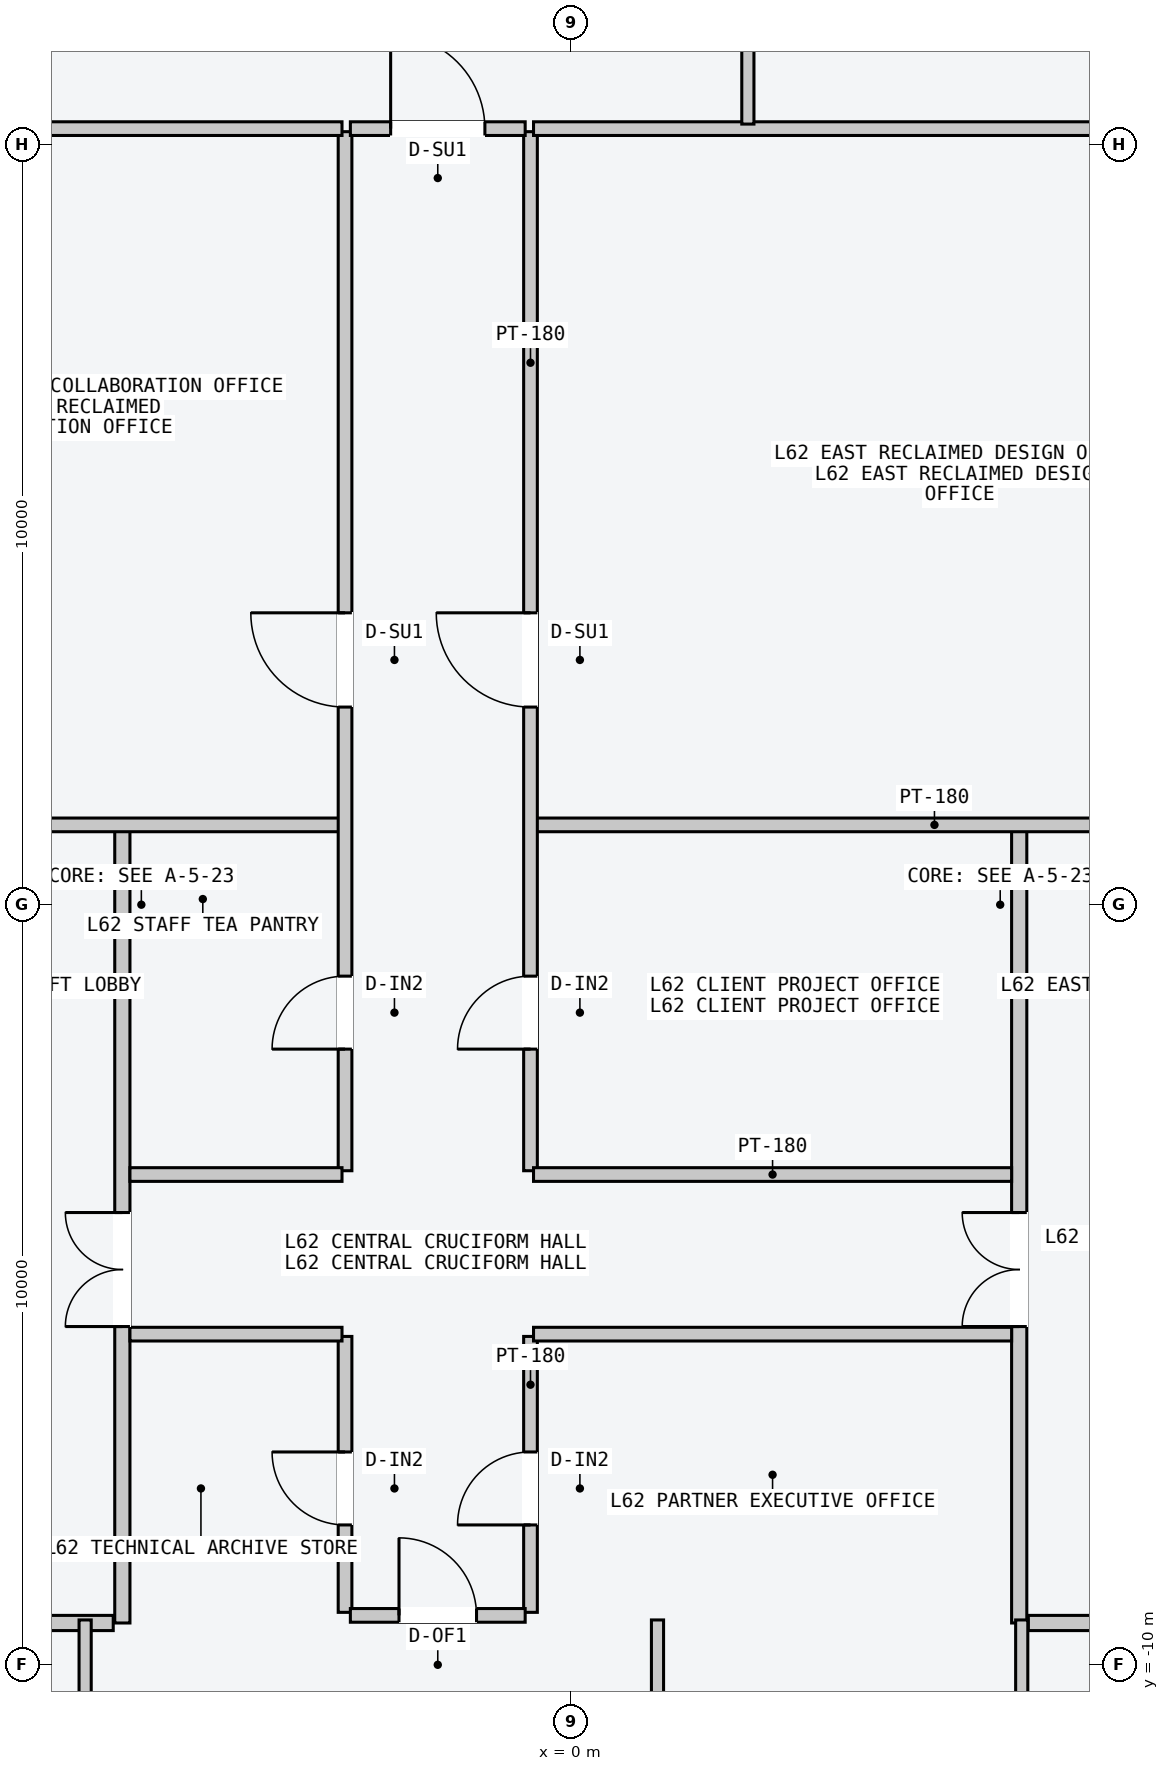
"""IFC4 building model, lengths in metres.
Left out: names, types, materials, properties, quantities, classifications, styles, units other than length and angle.
Written with IfcOpenShell. Run it as: python <this file> out.ifc"""

import sys

from ifc_helpers import new_model, si_unit, direction, frame, frame_2d, origin, place, context, subcontext, project, spatial, rectangle, extrude, element, fill, save


model = new_model("IFC4")
c1 = context("Model", 3, precision=1e-05, world=origin(), true_north=direction((0.0, 1.0)))
c2 = subcontext(c1, "Body", "Model", "MODEL_VIEW")
j1 = project(units=[si_unit("LENGTHUNIT", "METRE"), si_unit("PLANEANGLEUNIT", "RADIAN")], contexts=[c1])
p1 = place(None, origin())
s1 = spatial("IfcSite", under=j1, at=p1, CompositionType="ELEMENT")
p2 = place(p1, origin())
s2 = spatial("IfcBuilding", under=s1, at=p2, CompositionType="ELEMENT")
p3 = place(p2, frame((0.0, 0.0, 236.4)))
s3 = spatial("IfcBuildingStorey", under=s2, at=p3, CompositionType="ELEMENT", Elevation=236.4)
p4 = place(p3, frame((-5.9, -9.45, 0.0), z_axis=(0.0, 0.0, 1.0), x_axis=(0.0, 1.0, 0.0)))
e1 = element("IfcWall", 1, at=p4, inside=s3, PredefinedType="PARTITIONING", context=c2, shape_type="SweptSolid", body=[
    extrude(rectangle(XDim=10.5, YDim=0.2, at=frame_2d((5.25, 0.0))), origin(), (0.0, 0.0, 1.0), 3.4),
])
p5 = place(p4, frame((3.9, 0.0, 0.0)))
e2 = element("IfcOpeningElement", 2, at=p5, cuts=e1, PredefinedType="OPENING", context=c2, shape_type="SweptSolid", body=[
    extrude(rectangle(XDim=1.5, YDim=2.2, at=frame_2d((0.75, 1.1))), frame((0.0, 0.11, 0.0), z_axis=(0.0, -1.0, 0.0), x_axis=(1.0, 0.0, 0.0)), (0.0, 0.0, 1.0), 0.22),
])
p6 = place(p3, frame((-6.02, -9.45, 0.0), z_axis=(0.0, 0.0, 1.0), x_axis=(-1.0, 0.0, 0.0)))
e3 = element("IfcWall", 3, at=p6, inside=s3, PredefinedType="PARTITIONING", context=c2, shape_type="SweptSolid", body=[
    extrude(rectangle(XDim=1.8, YDim=0.2, at=frame_2d((0.9, 0.0))), origin(), (0.0, 0.0, 1.0), 3.4),
])
p7 = place(p3, frame((5.9, -9.45, 0.0), z_axis=(0.0, 0.0, 1.0), x_axis=(0.0, 1.0, 0.0)))
e4 = element("IfcWall", 4, at=p7, inside=s3, PredefinedType="PARTITIONING", context=c2, shape_type="SweptSolid", body=[
    extrude(rectangle(XDim=10.5, YDim=0.2, at=frame_2d((5.25, 0.0))), origin(), (0.0, 0.0, 1.0), 3.4),
])
p8 = place(p7, frame((3.9, 0.0, 0.0)))
e5 = element("IfcOpeningElement", 5, at=p8, cuts=e4, PredefinedType="OPENING", context=c2, shape_type="SweptSolid", body=[
    extrude(rectangle(XDim=1.5, YDim=2.2, at=frame_2d((0.75, 1.1))), frame((0.0, 0.11, 0.0), z_axis=(0.0, -1.0, 0.0), x_axis=(1.0, 0.0, 0.0)), (0.0, 0.0, 1.0), 0.22),
])
p9 = place(p3, frame((6.02, -9.45, 0.0), z_axis=(0.0, 0.0, 1.0), x_axis=(1.0, 0.0, 0.0)))
e6 = element("IfcWall", 6, at=p9, inside=s3, PredefinedType="PARTITIONING", context=c2, shape_type="SweptSolid", body=[
    extrude(rectangle(XDim=1.8, YDim=0.2, at=frame_2d((0.9, 0.0))), origin(), (0.0, 0.0, 1.0), 3.4),
])
p10 = place(p3, frame((-10.05, 1.05, 0.0), z_axis=(0.0, 0.0, 1.0), x_axis=(1.0, 0.0, 0.0)))
e7 = element("IfcWall", 7, at=p10, inside=s3, PredefinedType="PARTITIONING", context=c2, shape_type="SweptSolid", body=[
    extrude(rectangle(XDim=7.04, YDim=0.18, at=frame_2d((3.52, 0.0))), origin(), (0.0, 0.0, 1.0), 3.4),
])
p11 = place(p3, frame((-2.97, -3.5, 0.0), z_axis=(0.0, 0.0, 1.0), x_axis=(0.0, 1.0, 0.0)))
e8 = element("IfcWall", 8, at=p11, inside=s3, PredefinedType="PARTITIONING", context=c2, shape_type="SweptSolid", body=[
    extrude(rectangle(XDim=13.67, YDim=0.18, at=frame_2d((6.835, 0.0))), origin(), (0.0, 0.0, 1.0), 3.4),
])
p12 = place(p11, frame((6.1, 0.0, 0.0)))
e9 = element("IfcOpeningElement", 9, at=p12, cuts=e8, PredefinedType="OPENING", context=c2, shape_type="SweptSolid", body=[
    extrude(rectangle(XDim=1.24, YDim=2.24, at=frame_2d((0.62, 1.12))), frame((0.0, 0.1, 0.0), z_axis=(0.0, -1.0, 0.0), x_axis=(1.0, 0.0, 0.0)), (0.0, 0.0, 1.0), 0.2),
])
p13 = place(p11, frame((1.6, 0.0, 0.0)))
e10 = element("IfcOpeningElement", 10, at=p13, cuts=e8, PredefinedType="OPENING", context=c2, shape_type="SweptSolid", body=[
    extrude(rectangle(XDim=0.96, YDim=2.18, at=frame_2d((0.48, 1.09))), frame((0.0, 0.1, 0.0), z_axis=(0.0, -1.0, 0.0), x_axis=(1.0, 0.0, 0.0)), (0.0, 0.0, 1.0), 0.2),
])
p14 = place(p3, frame((-7.5, 10.21, 0.0), z_axis=(0.0, 0.0, 1.0), x_axis=(1.0, 0.0, 0.0)))
e11 = element("IfcWall", 11, at=p14, inside=s3, PredefinedType="PARTITIONING", context=c2, shape_type="SweptSolid", body=[
    extrude(rectangle(XDim=4.49, YDim=0.18, at=frame_2d((2.245, 0.0))), origin(), (0.0, 0.0, 1.0), 3.4),
])
p15 = place(p3, frame((-5.8, -3.55, 0.0), z_axis=(0.0, 0.0, 1.0), x_axis=(1.0, 0.0, 0.0)))
e12 = element("IfcWall", 12, at=p15, inside=s3, PredefinedType="PARTITIONING", context=c2, shape_type="SweptSolid", body=[
    extrude(rectangle(XDim=2.79, YDim=0.18, at=frame_2d((1.395, 0.0))), origin(), (0.0, 0.0, 1.0), 3.4),
])
p16 = place(p3, frame((-0.49, 1.05, 0.0), z_axis=(0.0, 0.0, 1.0), x_axis=(1.0, 0.0, 0.0)))
e13 = element("IfcWall", 13, at=p16, inside=s3, PredefinedType="PARTITIONING", context=c2, shape_type="SweptSolid", body=[
    extrude(rectangle(XDim=10.55, YDim=0.18, at=frame_2d((5.275, 0.0))), origin(), (0.0, 0.0, 1.0), 3.4),
])
p17 = place(p3, frame((-0.53, -3.5, 0.0), z_axis=(0.0, 0.0, 1.0), x_axis=(0.0, 1.0, 0.0)))
e14 = element("IfcWall", 14, at=p17, inside=s3, PredefinedType="PARTITIONING", context=c2, shape_type="SweptSolid", body=[
    extrude(rectangle(XDim=13.67, YDim=0.18, at=frame_2d((6.835, 0.0))), origin(), (0.0, 0.0, 1.0), 3.4),
])
p18 = place(p17, frame((6.1, 0.0, 0.0)))
e15 = element("IfcOpeningElement", 15, at=p18, cuts=e14, PredefinedType="OPENING", context=c2, shape_type="SweptSolid", body=[
    extrude(rectangle(XDim=1.24, YDim=2.24, at=frame_2d((0.62, 1.12))), frame((0.0, 0.1, 0.0), z_axis=(0.0, -1.0, 0.0), x_axis=(1.0, 0.0, 0.0)), (0.0, 0.0, 1.0), 0.2),
])
p19 = place(p17, frame((1.6, 0.0, 0.0)))
e16 = element("IfcOpeningElement", 16, at=p19, cuts=e14, PredefinedType="OPENING", context=c2, shape_type="SweptSolid", body=[
    extrude(rectangle(XDim=0.96, YDim=2.18, at=frame_2d((0.48, 1.09))), frame((0.0, 0.1, 0.0), z_axis=(0.0, -1.0, 0.0), x_axis=(1.0, 0.0, 0.0)), (0.0, 0.0, 1.0), 0.2),
])
p20 = place(p3, frame((-0.49, 10.21, 0.0), z_axis=(0.0, 0.0, 1.0), x_axis=(1.0, 0.0, 0.0)))
e17 = element("IfcWall", 17, at=p20, inside=s3, PredefinedType="PARTITIONING", context=c2, shape_type="SweptSolid", body=[
    extrude(rectangle(XDim=7.99, YDim=0.18, at=frame_2d((3.995, 0.0))), origin(), (0.0, 0.0, 1.0), 3.4),
])
p21 = place(p3, frame((-0.49, -3.55, 0.0), z_axis=(0.0, 0.0, 1.0), x_axis=(1.0, 0.0, 0.0)))
e18 = element("IfcWall", 18, at=p21, inside=s3, PredefinedType="PARTITIONING", context=c2, shape_type="SweptSolid", body=[
    extrude(rectangle(XDim=6.29, YDim=0.18, at=frame_2d((3.145, 0.0))), origin(), (0.0, 0.0, 1.0), 3.4),
])
p22 = place(p3, frame((-2.97, -9.31, 0.0), z_axis=(0.0, 0.0, 1.0), x_axis=(0.0, 1.0, 0.0)))
e19 = element("IfcWall", 19, at=p22, inside=s3, PredefinedType="PARTITIONING", context=c2, shape_type="SweptSolid", body=[
    extrude(rectangle(XDim=3.63, YDim=0.18, at=frame_2d((1.815, 0.0))), origin(), (0.0, 0.0, 1.0), 3.4),
])
p23 = place(p22, frame((1.15, 0.0, 0.0)))
e20 = element("IfcOpeningElement", 20, at=p23, cuts=e19, PredefinedType="OPENING", context=c2, shape_type="SweptSolid", body=[
    extrude(rectangle(XDim=0.96, YDim=2.18, at=frame_2d((0.48, 1.09))), frame((0.0, 0.1, 0.0), z_axis=(0.0, -1.0, 0.0), x_axis=(1.0, 0.0, 0.0)), (0.0, 0.0, 1.0), 0.2),
])
p24 = place(p3, frame((-0.53, -9.31, 0.0), z_axis=(0.0, 0.0, 1.0), x_axis=(0.0, 1.0, 0.0)))
e21 = element("IfcWall", 21, at=p24, inside=s3, PredefinedType="PARTITIONING", context=c2, shape_type="SweptSolid", body=[
    extrude(rectangle(XDim=3.63, YDim=0.18, at=frame_2d((1.815, 0.0))), origin(), (0.0, 0.0, 1.0), 3.4),
])
p25 = place(p24, frame((1.15, 0.0, 0.0)))
e22 = element("IfcOpeningElement", 22, at=p25, cuts=e21, PredefinedType="OPENING", context=c2, shape_type="SweptSolid", body=[
    extrude(rectangle(XDim=0.96, YDim=2.18, at=frame_2d((0.48, 1.09))), frame((0.0, 0.1, 0.0), z_axis=(0.0, -1.0, 0.0), x_axis=(1.0, 0.0, 0.0)), (0.0, 0.0, 1.0), 0.2),
])
p26 = place(p3, frame((-5.8, -5.65, 0.0), z_axis=(0.0, 0.0, 1.0), x_axis=(1.0, 0.0, 0.0)))
e23 = element("IfcWall", 23, at=p26, inside=s3, PredefinedType="PARTITIONING", context=c2, shape_type="SweptSolid", body=[
    extrude(rectangle(XDim=2.79, YDim=0.18, at=frame_2d((1.395, 0.0))), origin(), (0.0, 0.0, 1.0), 3.4),
])
p27 = place(p3, frame((-0.49, -5.65, 0.0), z_axis=(0.0, 0.0, 1.0), x_axis=(1.0, 0.0, 0.0)))
e24 = element("IfcWall", 24, at=p27, inside=s3, PredefinedType="PARTITIONING", context=c2, shape_type="SweptSolid", body=[
    extrude(rectangle(XDim=6.29, YDim=0.18, at=frame_2d((3.145, 0.0))), origin(), (0.0, 0.0, 1.0), 3.4),
])
p28 = place(p3, frame((2.33, 10.27, 0.0), z_axis=(0.0, 0.0, 1.0), x_axis=(0.0, 1.0, 0.0)))
e25 = element("IfcWall", 25, at=p28, inside=s3, PredefinedType="PARTITIONING", context=c2, shape_type="SweptSolid", body=[
    extrude(rectangle(XDim=6.28, YDim=0.16, at=frame_2d((3.14, 0.0))), origin(), (0.0, 0.0, 1.0), 3.4),
])
p29 = place(p28, frame((1.15, 0.0, 0.0)))
e26 = element("IfcOpeningElement", 26, at=p29, cuts=e25, PredefinedType="OPENING", context=c2, shape_type="SweptSolid", body=[
    extrude(rectangle(XDim=0.96, YDim=2.18, at=frame_2d((0.48, 1.09))), frame((0.0, 0.09, 0.0), z_axis=(0.0, -1.0, 0.0), x_axis=(1.0, 0.0, 0.0)), (0.0, 0.0, 1.0), 0.18),
])
p30 = place(p3, frame((-2.9, 10.21, 0.0), z_axis=(0.0, 0.0, 1.0), x_axis=(1.0, 0.0, 0.0)))
e27 = element("IfcWall", 27, at=p30, inside=s3, PredefinedType="PARTITIONING", context=c2, shape_type="SweptSolid", body=[
    extrude(rectangle(XDim=2.3, YDim=0.18, at=frame_2d((1.15, 0.0))), origin(), (0.0, 0.0, 1.0), 3.4),
])
p31 = place(p30, frame((0.53, 0.0, 0.0)))
e28 = element("IfcOpeningElement", 28, at=p31, cuts=e27, PredefinedType="OPENING", context=c2, shape_type="SweptSolid", body=[
    extrude(rectangle(XDim=1.24, YDim=2.24, at=frame_2d((0.62, 1.12))), frame((0.0, 0.1, 0.0), z_axis=(0.0, -1.0, 0.0), x_axis=(1.0, 0.0, 0.0)), (0.0, 0.0, 1.0), 0.2),
])
p32 = place(p3, frame((-6.39, -17.56, 0.0), z_axis=(0.0, 0.0, 1.0), x_axis=(0.0, 1.0, 0.0)))
e29 = element("IfcWall", 29, at=p32, inside=s3, PredefinedType="PARTITIONING", context=c2, shape_type="SweptSolid", body=[
    extrude(rectangle(XDim=8.15, YDim=0.16, at=frame_2d((4.075, 0.0))), origin(), (0.0, 0.0, 1.0), 3.4),
])
p33 = place(p32, frame((1.05, 0.0, 0.0)))
e30 = element("IfcOpeningElement", 30, at=p33, cuts=e29, PredefinedType="OPENING", context=c2, shape_type="SweptSolid", body=[
    extrude(rectangle(XDim=0.96, YDim=2.18, at=frame_2d((0.48, 1.09))), frame((0.0, 0.09, 0.0), z_axis=(0.0, -1.0, 0.0), x_axis=(1.0, 0.0, 0.0)), (0.0, 0.0, 1.0), 0.18),
])
p34 = place(p3, frame((1.141, -17.56, 0.0), z_axis=(0.0, 0.0, 1.0), x_axis=(0.0, 1.0, 0.0)))
e31 = element("IfcWall", 31, at=p34, inside=s3, PredefinedType="PARTITIONING", context=c2, shape_type="SweptSolid", body=[
    extrude(rectangle(XDim=8.15, YDim=0.16, at=frame_2d((4.075, 0.0))), origin(), (0.0, 0.0, 1.0), 3.4),
])
p35 = place(p34, frame((1.05, 0.0, 0.0)))
e32 = element("IfcOpeningElement", 32, at=p35, cuts=e31, PredefinedType="OPENING", context=c2, shape_type="SweptSolid", body=[
    extrude(rectangle(XDim=0.96, YDim=2.18, at=frame_2d((0.48, 1.09))), frame((0.0, 0.09, 0.0), z_axis=(0.0, -1.0, 0.0), x_axis=(1.0, 0.0, 0.0)), (0.0, 0.0, 1.0), 0.18),
])
p36 = place(p3, frame((5.933, -17.56, 0.0), z_axis=(0.0, 0.0, 1.0), x_axis=(0.0, 1.0, 0.0)))
e33 = element("IfcWall", 33, at=p36, inside=s3, PredefinedType="PARTITIONING", context=c2, shape_type="SweptSolid", body=[
    extrude(rectangle(XDim=8.15, YDim=0.16, at=frame_2d((4.075, 0.0))), origin(), (0.0, 0.0, 1.0), 3.4),
])
p37 = place(p36, frame((1.05, 0.0, 0.0)))
e34 = element("IfcOpeningElement", 34, at=p37, cuts=e33, PredefinedType="OPENING", context=c2, shape_type="SweptSolid", body=[
    extrude(rectangle(XDim=0.96, YDim=2.18, at=frame_2d((0.48, 1.09))), frame((0.0, 0.09, 0.0), z_axis=(0.0, -1.0, 0.0), x_axis=(1.0, 0.0, 0.0)), (0.0, 0.0, 1.0), 0.18),
])
p38 = place(p3, frame((-2.9, -9.35, 0.0), z_axis=(0.0, 0.0, 1.0), x_axis=(1.0, 0.0, 0.0)))
e35 = element("IfcWall", 35, at=p38, inside=s3, PredefinedType="PARTITIONING", context=c2, shape_type="SweptSolid", body=[
    extrude(rectangle(XDim=2.3, YDim=0.18, at=frame_2d((1.15, 0.0))), origin(), (0.0, 0.0, 1.0), 3.4),
])
p39 = place(p38, frame((0.64, 0.0, 0.0)))
e36 = element("IfcOpeningElement", 36, at=p39, cuts=e35, PredefinedType="OPENING", context=c2, shape_type="SweptSolid", body=[
    extrude(rectangle(XDim=1.02, YDim=2.2, at=frame_2d((0.51, 1.1))), frame((0.0, 0.1, 0.0), z_axis=(0.0, -1.0, 0.0), x_axis=(1.0, 0.0, 0.0)), (0.0, 0.0, 1.0), 0.2),
])
p40 = place(p5, origin())
e37 = element("IfcDoor", 37, at=p40, inside=s3, OperationType="DOUBLE_DOOR_SINGLE_SWING", PredefinedType="DOOR", context=c2, shape_type="SweptSolid", body=[
    extrude(rectangle(XDim=1.5, YDim=2.2, at=frame_2d((0.75, 1.1))), frame((0.0, 0.025, 0.0), z_axis=(0.0, -1.0, 0.0), x_axis=(1.0, 0.0, 0.0)), (0.0, 0.0, 1.0), 0.05),
])
fill(e2, e37)
p41 = place(p8, origin())
e38 = element("IfcDoor", 38, at=p41, inside=s3, OperationType="DOUBLE_DOOR_SINGLE_SWING", PredefinedType="DOOR", context=c2, shape_type="SweptSolid", body=[
    extrude(rectangle(XDim=1.5, YDim=2.2, at=frame_2d((0.75, 1.1))), frame((0.0, 0.025, 0.0), z_axis=(0.0, -1.0, 0.0), x_axis=(1.0, 0.0, 0.0)), (0.0, 0.0, 1.0), 0.05),
])
fill(e5, e38)
p42 = place(p12, origin())
e39 = element("IfcDoor", 39, at=p42, inside=s3, OperationType="SINGLE_SWING_RIGHT", PredefinedType="DOOR", context=c2, shape_type="SweptSolid", body=[
    extrude(rectangle(XDim=1.24, YDim=2.24, at=frame_2d((0.62, 1.12))), frame((0.0, 0.025, 0.0), z_axis=(0.0, -1.0, 0.0), x_axis=(1.0, 0.0, 0.0)), (0.0, 0.0, 1.0), 0.05),
])
fill(e9, e39)
p43 = place(p13, origin())
e40 = element("IfcDoor", 40, at=p43, inside=s3, OperationType="SINGLE_SWING_LEFT", PredefinedType="DOOR", context=c2, shape_type="SweptSolid", body=[
    extrude(rectangle(XDim=0.96, YDim=2.18, at=frame_2d((0.48, 1.09))), frame((0.0, 0.025, 0.0), z_axis=(0.0, -1.0, 0.0), x_axis=(1.0, 0.0, 0.0)), (0.0, 0.0, 1.0), 0.05),
])
fill(e10, e40)
p44 = place(p18, origin())
e41 = element("IfcDoor", 41, at=p44, inside=s3, OperationType="SINGLE_SWING_RIGHT", PredefinedType="DOOR", context=c2, shape_type="SweptSolid", body=[
    extrude(rectangle(XDim=1.24, YDim=2.24, at=frame_2d((0.62, 1.12))), frame((0.0, 0.025, 0.0), z_axis=(0.0, -1.0, 0.0), x_axis=(1.0, 0.0, 0.0)), (0.0, 0.0, 1.0), 0.05),
])
fill(e15, e41)
p45 = place(p19, origin())
e42 = element("IfcDoor", 42, at=p45, inside=s3, OperationType="SINGLE_SWING_LEFT", PredefinedType="DOOR", context=c2, shape_type="SweptSolid", body=[
    extrude(rectangle(XDim=0.96, YDim=2.18, at=frame_2d((0.48, 1.09))), frame((0.0, 0.025, 0.0), z_axis=(0.0, -1.0, 0.0), x_axis=(1.0, 0.0, 0.0)), (0.0, 0.0, 1.0), 0.05),
])
fill(e16, e42)
p46 = place(p23, origin())
e43 = element("IfcDoor", 43, at=p46, inside=s3, OperationType="SINGLE_SWING_RIGHT", PredefinedType="DOOR", context=c2, shape_type="SweptSolid", body=[
    extrude(rectangle(XDim=0.96, YDim=2.18, at=frame_2d((0.48, 1.09))), frame((0.0, 0.025, 0.0), z_axis=(0.0, -1.0, 0.0), x_axis=(1.0, 0.0, 0.0)), (0.0, 0.0, 1.0), 0.05),
])
fill(e20, e43)
p47 = place(p25, origin())
e44 = element("IfcDoor", 44, at=p47, inside=s3, OperationType="SINGLE_SWING_LEFT", PredefinedType="DOOR", context=c2, shape_type="SweptSolid", body=[
    extrude(rectangle(XDim=0.96, YDim=2.18, at=frame_2d((0.48, 1.09))), frame((0.0, 0.025, 0.0), z_axis=(0.0, -1.0, 0.0), x_axis=(1.0, 0.0, 0.0)), (0.0, 0.0, 1.0), 0.05),
])
fill(e22, e44)
p48 = place(p31, origin())
e45 = element("IfcDoor", 45, at=p48, inside=s3, OperationType="SINGLE_SWING_LEFT", PredefinedType="DOOR", context=c2, shape_type="SweptSolid", body=[
    extrude(rectangle(XDim=1.24, YDim=2.24, at=frame_2d((0.62, 1.12))), frame((0.0, 0.025, 0.0), z_axis=(0.0, -1.0, 0.0), x_axis=(1.0, 0.0, 0.0)), (0.0, 0.0, 1.0), 0.05),
])
fill(e28, e45)
p49 = place(p39, origin())
e46 = element("IfcDoor", 46, at=p49, inside=s3, OperationType="SINGLE_SWING_LEFT", PredefinedType="DOOR", context=c2, shape_type="SweptSolid", body=[
    extrude(rectangle(XDim=1.02, YDim=2.2, at=frame_2d((0.51, 1.1))), frame((0.0, 0.025, 0.0), z_axis=(0.0, -1.0, 0.0), x_axis=(1.0, 0.0, 0.0)), (0.0, 0.0, 1.0), 0.05),
])
fill(e36, e46)
save(model, sys.argv[1])
